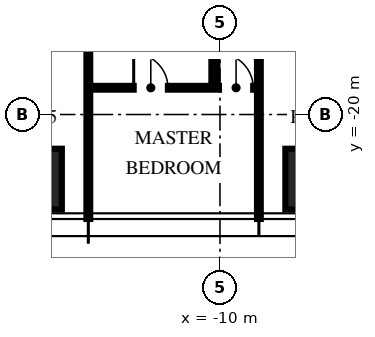
"""IFC4 building model, lengths in metres.
Left out: names, types, materials, properties, quantities, classifications, styles, units other than length and angle.
Written with IfcOpenShell. Run it as: python <this file> out.ifc"""

import sys

from ifc_helpers import new_model, si_unit, direction, frame, frame_2d, origin, origin_2d, place, context, subcontext, project, spatial, rectangle, extrude, element, fill, save


model = new_model("IFC4")
c1 = context("Model", 3, precision=1e-05, world=origin(), true_north=direction((0.0, 1.0)))
c2 = subcontext(c1, "Body", "Model", "MODEL_VIEW")
j1 = project(units=[si_unit("LENGTHUNIT", "METRE"), si_unit("PLANEANGLEUNIT", "RADIAN")], contexts=[c1])
p1 = place(None, origin())
s1 = spatial("IfcSite", under=j1, at=p1, CompositionType="ELEMENT")
p2 = place(p1, origin())
s2 = spatial("IfcBuilding", under=s1, at=p2, CompositionType="ELEMENT")
p3 = place(p2, frame((0.0, 0.0, 349.5)))
s3 = spatial("IfcBuildingStorey", under=s2, at=p3, CompositionType="ELEMENT", Elevation=349.5)
for number, where, z_axis, x_axis in (
    (1, (-7.48, -21.7, 0.0), (0.0, 0.0, 1.0), (1.0, 0.0, 0.0)),
    (2, (-14.96, -21.7, 0.0), (0.0, 0.0, 1.0), (1.0, 0.0, 0.0)),
):
    element("IfcColumn", number, at=place(p3, frame(where, z_axis=z_axis, x_axis=x_axis)), inside=s3, PredefinedType="COLUMN", context=c2, shape_type="SweptSolid", body=[
        extrude(rectangle(XDim=1.6, YDim=1.6, at=origin_2d()), origin(), (0.0, 0.0, 1.0), 3.75),
    ])
for number, where, z_axis, x_axis in (
    (3, (-13.464, -17.296, 0.0), (0.0, 0.0, 1.0), (0.0, -1.0, 0.0)),
    (4, (-8.976, -17.296, 0.0), (0.0, 0.0, 1.0), (0.0, -1.0, 0.0)),
):
    element("IfcWall", number, at=place(p3, frame(where, z_axis=z_axis, x_axis=x_axis)), inside=s3, PredefinedType="PARTITIONING", context=c2, shape_type="SweptSolid", body=[
        extrude(rectangle(XDim=5.454, YDim=0.1, at=frame_2d((2.727, 0.0))), origin(), (0.0, 0.0, 1.0), 2.85),
    ])
p4 = place(p3, frame((-13.464, -19.296, 0.0), z_axis=(0.0, 0.0, 1.0), x_axis=(1.0, 0.0, 0.0)))
e5 = element("IfcWall", 5, at=p4, inside=s3, PredefinedType="PARTITIONING", context=c2, shape_type="SweptSolid", body=[
    extrude(rectangle(XDim=4.488, YDim=0.1, at=frame_2d((2.244, 0.0))), origin(), (0.0, 0.0, 1.0), 2.56),
])
p5 = place(p4, frame((3.438, 0.0, 0.0)))
e6 = element("IfcOpeningElement", 6, at=p5, cuts=e5, PredefinedType="OPENING", context=c2, shape_type="SweptSolid", body=[
    extrude(rectangle(XDim=0.9, YDim=2.1, at=frame_2d((0.45, 1.05))), frame((0.0, 0.06, 0.0), z_axis=(0.0, -1.0, 0.0), x_axis=(1.0, 0.0, 0.0)), (0.0, 0.0, 1.0), 0.12),
])
p6 = place(p4, frame((1.194, 0.0, 0.0)))
e7 = element("IfcOpeningElement", 7, at=p6, cuts=e5, PredefinedType="OPENING", context=c2, shape_type="SweptSolid", body=[
    extrude(rectangle(XDim=0.9, YDim=2.1, at=frame_2d((0.45, 1.05))), frame((0.0, 0.06, 0.0), z_axis=(0.0, -1.0, 0.0), x_axis=(1.0, 0.0, 0.0)), (0.0, 0.0, 1.0), 0.12),
])
p7 = place(p3, frame((-10.176, -17.296, 0.0), z_axis=(0.0, 0.0, 1.0), x_axis=(0.0, -1.0, 0.0)))
e8 = element("IfcWall", 8, at=p7, inside=s3, PredefinedType="PARTITIONING", context=c2, shape_type="SweptSolid", body=[
    extrude(rectangle(XDim=2.0, YDim=0.1, at=frame_2d((1.0, 0.0))), origin(), (0.0, 0.0, 1.0), 3.45),
])
p8 = place(p5, origin())
e9 = element("IfcDoor", 9, at=p8, inside=s3, OperationType="SINGLE_SWING_LEFT", PredefinedType="DOOR", context=c2, shape_type="SweptSolid", body=[
    extrude(rectangle(XDim=0.9, YDim=2.1, at=frame_2d((0.45, 1.05))), frame((0.0, 0.025, 0.0), z_axis=(0.0, -1.0, 0.0), x_axis=(1.0, 0.0, 0.0)), (0.0, 0.0, 1.0), 0.05),
])
fill(e6, e9)
p9 = place(p6, origin())
e10 = element("IfcDoor", 10, at=p9, inside=s3, OperationType="SINGLE_SWING_LEFT", PredefinedType="DOOR", context=c2, shape_type="SweptSolid", body=[
    extrude(rectangle(XDim=0.9, YDim=2.1, at=frame_2d((0.45, 1.05))), frame((0.0, 0.025, 0.0), z_axis=(0.0, -1.0, 0.0), x_axis=(1.0, 0.0, 0.0)), (0.0, 0.0, 1.0), 0.05),
])
fill(e7, e10)
save(model, sys.argv[1])
